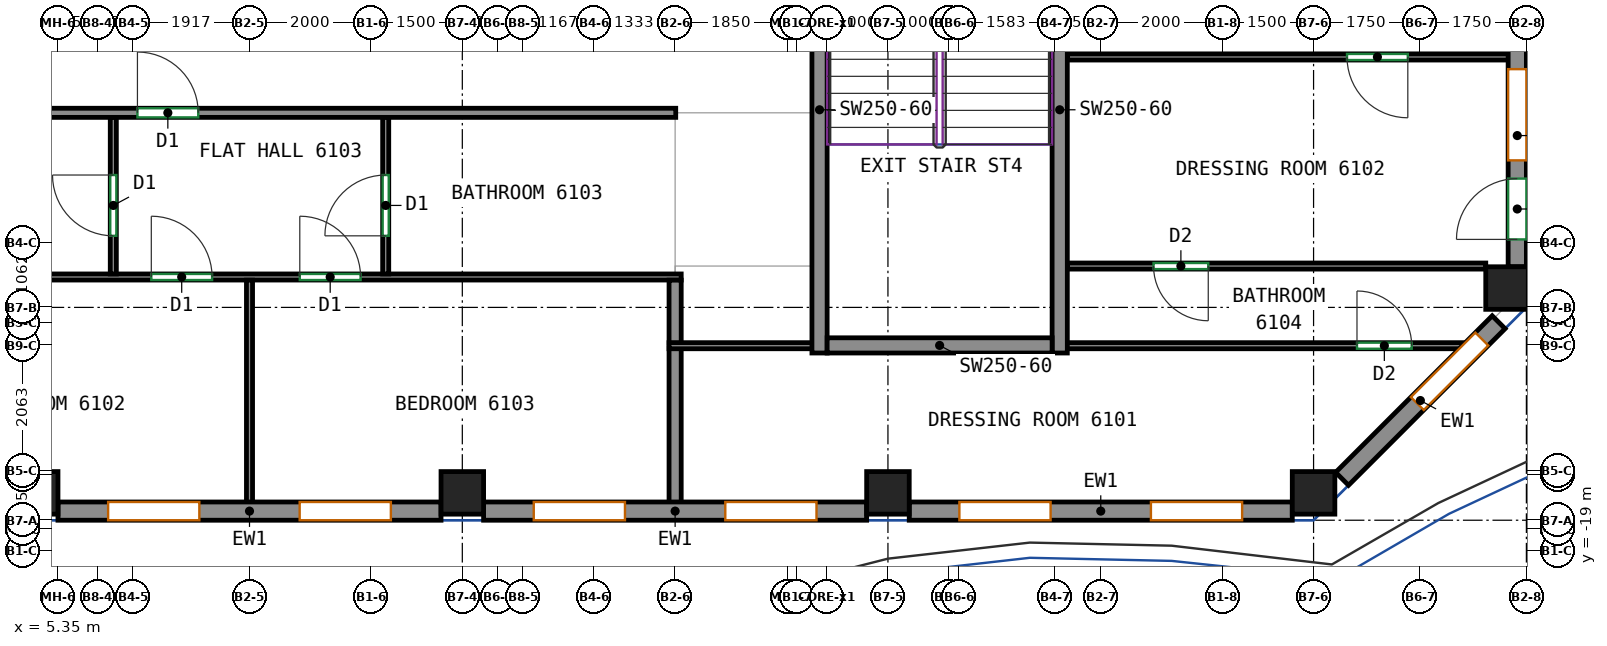
"""IFC4 building model, lengths in metres.
Left out: names, types, materials, properties, quantities, classifications, styles, units other than length and angle.
Written with IfcOpenShell. Run it as: python <this file> out.ifc"""

import sys

from ifc_helpers import new_model, si_unit, direction, frame, frame_2d, origin, origin_2d, place, context, subcontext, project, spatial, rectangle, extrude, source, transform, mapped, element, fill, save


model = new_model("IFC4")
c1 = context("Model", 3, precision=1e-05, world=origin(), true_north=direction((0.0, 1.0)))
c2 = subcontext(c1, "Body", "Model", "MODEL_VIEW")
j1 = project(units=[si_unit("LENGTHUNIT", "METRE"), si_unit("PLANEANGLEUNIT", "RADIAN")], contexts=[c1])
p1 = place(None, origin())
s1 = spatial("IfcSite", under=j1, at=p1, CompositionType="ELEMENT")
p2 = place(p1, origin())
s2 = spatial("IfcBuilding", under=s1, at=p2, CompositionType="ELEMENT")
p3 = place(p2, frame((0.0, 0.0, 252.6)))
s3 = spatial("IfcBuildingStorey", under=s2, at=p3, CompositionType="ELEMENT", Elevation=252.6)
m1 = source(origin(), c2, "Body", "SweptSolid", [
    extrude(rectangle(XDim=0.7, YDim=0.7, at=origin_2d()), origin(), (0.0, 0.0, 1.0), 3.12),
])
for number, where, z_axis, x_axis in (
    (1, (5.0, -18.05, 0.0), (0.0, 0.0, 1.0), (1.0, 0.0, 0.0)),
    (2, (12.0, -18.05, 0.0), (0.0, 0.0, 1.0), (1.0, 0.0, 0.0)),
    (3, (19.0, -18.05, 0.0), (0.0, 0.0, 1.0), (1.0, 0.0, 0.0)),
    (4, (26.0, -18.05, 0.0), (0.0, 0.0, 1.0), (1.0, 0.0, 0.0)),
    (5, (29.182, -14.682, 0.0), (0.0, 0.0, 1.0), (1.0, 0.0, 0.0)),
):
    element("IfcColumn", number, at=place(p3, frame(where, z_axis=z_axis, x_axis=x_axis)), inside=s3, PredefinedType="COLUMN", context=c2, shape_type="MappedRepresentation", body=[
        mapped(m1, transform((0.0, 0.0, 0.0))),
    ])
m2 = source(origin(), c2, "Body", "SweptSolid", [
    extrude(rectangle(XDim=8.0, YDim=0.25, at=frame_2d((4.0, 0.0))), origin(), (0.0, 0.0, 1.0), 3.12),
])
for number, where, z_axis, x_axis in (
    (6, (17.875, -15.75, 0.0), (0.0, 0.0, 1.0), (0.0, 1.0, 0.0)),
    (7, (21.825, -15.75, 0.0), (0.0, 0.0, 1.0), (0.0, 1.0, 0.0)),
):
    element("IfcWall", number, at=place(p3, frame(where, z_axis=z_axis, x_axis=x_axis)), inside=s3, PredefinedType="SHEAR", context=c2, shape_type="MappedRepresentation", body=[
        mapped(m2, transform((0.0, 0.0, 0.0))),
    ])
m3 = source(origin(), c2, "Body", "SweptSolid", [
    extrude(rectangle(XDim=3.7, YDim=0.25, at=frame_2d((1.85, 0.0))), origin(), (0.0, 0.0, 1.0), 3.12),
])
p4 = place(p3, frame((18.0, -15.625, 0.0), z_axis=(0.0, 0.0, 1.0), x_axis=(1.0, 0.0, 0.0)))
e8 = element("IfcWall", 8, at=p4, inside=s3, PredefinedType="SHEAR", context=c2, shape_type="MappedRepresentation", body=[
    mapped(m3, transform((0.0, 0.0, 0.0))),
])
m4 = source(origin(), c2, "Body", "SweptSolid", [
    extrude(rectangle(XDim=6.3, YDim=0.3, at=frame_2d((3.15, 0.0))), origin(), (0.0, 0.0, 1.0), 3.12),
])
p5 = place(p3, frame((5.35, -18.35, 0.0), z_axis=(0.0, 0.0, 1.0), x_axis=(1.0, 0.0, 0.0)))
e9 = element("IfcWall", 9, at=p5, inside=s3, PredefinedType="SOLIDWALL", context=c2, shape_type="MappedRepresentation", body=[
    mapped(m4, transform((0.0, 0.0, 0.0))),
])
p6 = place(p5, frame((0.825, 0.0, 0.8)))
e10 = element("IfcOpeningElement", 10, at=p6, cuts=e9, PredefinedType="OPENING", context=c2, shape_type="SweptSolid", body=[
    extrude(rectangle(XDim=1.5, YDim=2.05, at=frame_2d((0.75, 1.025))), frame((0.0, 0.16, 0.0), z_axis=(0.0, -1.0, 0.0), x_axis=(1.0, 0.0, 0.0)), (0.0, 0.0, 1.0), 0.32),
])
p7 = place(p5, frame((3.975, 0.0, 0.8)))
e11 = element("IfcOpeningElement", 11, at=p7, cuts=e9, PredefinedType="OPENING", context=c2, shape_type="SweptSolid", body=[
    extrude(rectangle(XDim=1.5, YDim=2.05, at=frame_2d((0.75, 1.025))), frame((0.0, 0.16, 0.0), z_axis=(0.0, -1.0, 0.0), x_axis=(1.0, 0.0, 0.0)), (0.0, 0.0, 1.0), 0.32),
])
p8 = place(p3, frame((12.35, -18.35, 0.0), z_axis=(0.0, 0.0, 1.0), x_axis=(1.0, 0.0, 0.0)))
e12 = element("IfcWall", 12, at=p8, inside=s3, PredefinedType="SOLIDWALL", context=c2, shape_type="MappedRepresentation", body=[
    mapped(m4, transform((0.0, 0.0, 0.0))),
])
p9 = place(p8, frame((0.825, 0.0, 0.8)))
e13 = element("IfcOpeningElement", 13, at=p9, cuts=e12, PredefinedType="OPENING", context=c2, shape_type="SweptSolid", body=[
    extrude(rectangle(XDim=1.5, YDim=2.05, at=frame_2d((0.75, 1.025))), frame((0.0, 0.16, 0.0), z_axis=(0.0, -1.0, 0.0), x_axis=(1.0, 0.0, 0.0)), (0.0, 0.0, 1.0), 0.32),
])
p10 = place(p8, frame((3.975, 0.0, 0.8)))
e14 = element("IfcOpeningElement", 14, at=p10, cuts=e12, PredefinedType="OPENING", context=c2, shape_type="SweptSolid", body=[
    extrude(rectangle(XDim=1.5, YDim=2.05, at=frame_2d((0.75, 1.025))), frame((0.0, 0.16, 0.0), z_axis=(0.0, -1.0, 0.0), x_axis=(1.0, 0.0, 0.0)), (0.0, 0.0, 1.0), 0.32),
])
p11 = place(p3, frame((19.35, -18.35, 0.0), z_axis=(0.0, 0.0, 1.0), x_axis=(1.0, 0.0, 0.0)))
e15 = element("IfcWall", 15, at=p11, inside=s3, PredefinedType="SOLIDWALL", context=c2, shape_type="MappedRepresentation", body=[
    mapped(m4, transform((0.0, 0.0, 0.0))),
])
p12 = place(p11, frame((0.825, 0.0, 0.8)))
e16 = element("IfcOpeningElement", 16, at=p12, cuts=e15, PredefinedType="OPENING", context=c2, shape_type="SweptSolid", body=[
    extrude(rectangle(XDim=1.5, YDim=2.05, at=frame_2d((0.75, 1.025))), frame((0.0, 0.16, 0.0), z_axis=(0.0, -1.0, 0.0), x_axis=(1.0, 0.0, 0.0)), (0.0, 0.0, 1.0), 0.32),
])
p13 = place(p11, frame((3.975, 0.0, 0.8)))
e17 = element("IfcOpeningElement", 17, at=p13, cuts=e15, PredefinedType="OPENING", context=c2, shape_type="SweptSolid", body=[
    extrude(rectangle(XDim=1.5, YDim=2.05, at=frame_2d((0.75, 1.025))), frame((0.0, 0.16, 0.0), z_axis=(0.0, -1.0, 0.0), x_axis=(1.0, 0.0, 0.0)), (0.0, 0.0, 1.0), 0.32),
])
m5 = source(origin(), c2, "Body", "SweptSolid", [
    extrude(rectangle(XDim=3.642, YDim=0.3, at=frame_2d((1.821, 0.0))), origin(), (0.0, 0.0, 1.0), 3.12),
])
p14 = place(p3, frame((26.469, -17.819, 0.0), z_axis=(0.0, 0.0, 1.0), x_axis=(0.707106781187, 0.707106781187, 0.0)))
e18 = element("IfcWall", 18, at=p14, inside=s3, PredefinedType="SOLIDWALL", context=c2, shape_type="MappedRepresentation", body=[
    mapped(m5, transform((0.0, 0.0, 0.0))),
])
p15 = place(p14, frame((1.75, 0.0, 0.8)))
e19 = element("IfcOpeningElement", 19, at=p15, cuts=e18, PredefinedType="OPENING", context=c2, shape_type="SweptSolid", body=[
    extrude(rectangle(XDim=1.5, YDim=2.05, at=frame_2d((0.75, 1.025))), frame((0.0, 0.16, 0.0), z_axis=(0.0, -1.0, 0.0), x_axis=(1.0, 0.0, 0.0)), (0.0, 0.0, 1.0), 0.32),
])
m6 = source(origin(), c2, "Body", "SweptSolid", [
    extrude(rectangle(XDim=4.315, YDim=0.3, at=frame_2d((2.158, 0.0))), origin(), (0.0, 0.0, 1.0), 3.12),
])
p16 = place(p3, frame((29.35, -14.332, 0.0), z_axis=(0.0, 0.0, 1.0), x_axis=(0.0, 1.0, 0.0)))
e20 = element("IfcWall", 20, at=p16, inside=s3, PredefinedType="SOLIDWALL", context=c2, shape_type="MappedRepresentation", body=[
    mapped(m6, transform((0.0, 0.0, 0.0))),
])
p17 = place(p16, frame((1.75, 0.0, 0.8)))
e21 = element("IfcOpeningElement", 21, at=p17, cuts=e20, PredefinedType="OPENING", context=c2, shape_type="SweptSolid", body=[
    extrude(rectangle(XDim=1.5, YDim=2.05, at=frame_2d((0.75, 1.025))), frame((0.0, 0.16, 0.0), z_axis=(0.0, -1.0, 0.0), x_axis=(1.0, 0.0, 0.0)), (0.0, 0.0, 1.0), 0.32),
])
p18 = place(p16, frame((0.45, 0.0, 0.0)))
e22 = element("IfcOpeningElement", 22, at=p18, cuts=e20, PredefinedType="OPENING", context=c2, shape_type="SweptSolid", body=[
    extrude(rectangle(XDim=1.0, YDim=2.1, at=frame_2d((0.5, 1.05))), frame((0.0, 0.16, 0.0), z_axis=(0.0, -1.0, 0.0), x_axis=(1.0, 0.0, 0.0)), (0.0, 0.0, 1.0), 0.32),
])
p19 = place(p3, frame((-11.8, -11.8, 0.0), z_axis=(0.0, 0.0, 1.0), x_axis=(1.0, 0.0, 0.0)))
e23 = element("IfcWall", 23, at=p19, inside=s3, PredefinedType="PARTITIONING", context=c2, shape_type="SweptSolid", body=[
    extrude(rectangle(XDim=27.31, YDim=0.15, at=frame_2d((13.655, 0.0))), origin(), (0.0, 0.0, 1.0), 3.12),
])
p20 = place(p19, frame((5.021, 0.0, 0.0)))
e24 = element("IfcOpeningElement", 24, at=p20, cuts=e23, PredefinedType="OPENING", context=c2, shape_type="SweptSolid", body=[
    extrude(rectangle(XDim=1.0, YDim=2.1, at=frame_2d((0.5, 1.05))), frame((0.0, 0.085, 0.0), z_axis=(0.0, -1.0, 0.0), x_axis=(1.0, 0.0, 0.0)), (0.0, 0.0, 1.0), 0.17),
])
p21 = place(p19, frame((18.457, 0.0, 0.0)))
e25 = element("IfcOpeningElement", 25, at=p21, cuts=e23, PredefinedType="OPENING", context=c2, shape_type="SweptSolid", body=[
    extrude(rectangle(XDim=1.0, YDim=2.1, at=frame_2d((0.5, 1.05))), frame((0.0, 0.085, 0.0), z_axis=(0.0, -1.0, 0.0), x_axis=(1.0, 0.0, 0.0)), (0.0, 0.0, 1.0), 0.17),
])
p22 = place(p3, frame((-9.06, -14.5, 0.0), z_axis=(0.0, 0.0, 1.0), x_axis=(1.0, 0.0, 0.0)))
e26 = element("IfcWall", 26, at=p22, inside=s3, PredefinedType="PARTITIONING", context=c2, shape_type="SweptSolid", body=[
    extrude(rectangle(XDim=24.66, YDim=0.1, at=frame_2d((12.33, 0.0))), origin(), (0.0, 0.0, 1.0), 3.12),
])
p23 = place(p22, frame((0.924, 0.0, 0.0)))
e27 = element("IfcOpeningElement", 27, at=p23, cuts=e26, PredefinedType="OPENING", context=c2, shape_type="SweptSolid", body=[
    extrude(rectangle(XDim=1.0, YDim=2.1, at=frame_2d((0.5, 1.05))), frame((0.0, 0.06, 0.0), z_axis=(0.0, -1.0, 0.0), x_axis=(1.0, 0.0, 0.0)), (0.0, 0.0, 1.0), 0.12),
])
p24 = place(p22, frame((15.945, 0.0, 0.0)))
e28 = element("IfcOpeningElement", 28, at=p24, cuts=e26, PredefinedType="OPENING", context=c2, shape_type="SweptSolid", body=[
    extrude(rectangle(XDim=1.0, YDim=2.1, at=frame_2d((0.5, 1.05))), frame((0.0, 0.06, 0.0), z_axis=(0.0, -1.0, 0.0), x_axis=(1.0, 0.0, 0.0)), (0.0, 0.0, 1.0), 0.12),
])
p25 = place(p22, frame((18.387, 0.0, 0.0)))
e29 = element("IfcOpeningElement", 29, at=p25, cuts=e26, PredefinedType="OPENING", context=c2, shape_type="SweptSolid", body=[
    extrude(rectangle(XDim=1.0, YDim=2.1, at=frame_2d((0.5, 1.05))), frame((0.0, 0.06, 0.0), z_axis=(0.0, -1.0, 0.0), x_axis=(1.0, 0.0, 0.0)), (0.0, 0.0, 1.0), 0.12),
])
p26 = place(p3, frame((6.26, -14.45, 0.0), z_axis=(0.0, 0.0, 1.0), x_axis=(0.0, 1.0, 0.0)))
e30 = element("IfcWall", 30, at=p26, inside=s3, PredefinedType="PARTITIONING", context=c2, shape_type="SweptSolid", body=[
    extrude(rectangle(XDim=2.573, YDim=0.1, at=frame_2d((1.287, 0.0))), origin(), (0.0, 0.0, 1.0), 3.12),
])
p27 = place(p26, frame((0.627, 0.0, 0.0)))
e31 = element("IfcOpeningElement", 31, at=p27, cuts=e30, PredefinedType="OPENING", context=c2, shape_type="SweptSolid", body=[
    extrude(rectangle(XDim=1.0, YDim=2.1, at=frame_2d((0.5, 1.05))), frame((0.0, 0.06, 0.0), z_axis=(0.0, -1.0, 0.0), x_axis=(1.0, 0.0, 0.0)), (0.0, 0.0, 1.0), 0.12),
])
p28 = place(p3, frame((10.74, -14.45, 0.0), z_axis=(0.0, 0.0, 1.0), x_axis=(0.0, 1.0, 0.0)))
e32 = element("IfcWall", 32, at=p28, inside=s3, PredefinedType="PARTITIONING", context=c2, shape_type="SweptSolid", body=[
    extrude(rectangle(XDim=2.573, YDim=0.1, at=frame_2d((1.287, 0.0))), origin(), (0.0, 0.0, 1.0), 3.12),
])
p29 = place(p28, frame((0.627, 0.0, 0.0)))
e33 = element("IfcOpeningElement", 33, at=p29, cuts=e32, PredefinedType="OPENING", context=c2, shape_type="SweptSolid", body=[
    extrude(rectangle(XDim=1.0, YDim=2.1, at=frame_2d((0.5, 1.05))), frame((0.0, 0.06, 0.0), z_axis=(0.0, -1.0, 0.0), x_axis=(1.0, 0.0, 0.0)), (0.0, 0.0, 1.0), 0.12),
])
p30 = place(p3, frame((8.5, -18.25, 0.0), z_axis=(0.0, 0.0, 1.0), x_axis=(0.0, 1.0, 0.0)))
e34 = element("IfcWall", 34, at=p30, inside=s3, PredefinedType="PARTITIONING", context=c2, shape_type="SweptSolid", body=[
    extrude(rectangle(XDim=3.698, YDim=0.1, at=frame_2d((1.849, 0.0))), origin(), (0.0, 0.0, 1.0), 3.12),
])
p31 = place(p3, frame((15.5, -18.25, 0.0), z_axis=(0.0, 0.0, 1.0), x_axis=(0.0, 1.0, 0.0)))
e35 = element("IfcWall", 35, at=p31, inside=s3, PredefinedType="PARTITIONING", context=c2, shape_type="SweptSolid", body=[
    extrude(rectangle(XDim=2.58, YDim=0.2, at=frame_2d((1.29, 0.0))), origin(), (0.0, 0.0, 1.0), 3.12),
])
p32 = place(p3, frame((15.5, -15.59, 0.0), z_axis=(0.0, 0.0, 1.0), x_axis=(0.0, 1.0, 0.0)))
e36 = element("IfcWall", 36, at=p32, inside=s3, PredefinedType="PARTITIONING", context=c2, shape_type="SweptSolid", body=[
    extrude(rectangle(XDim=1.038, YDim=0.2, at=frame_2d((0.519, 0.0))), origin(), (0.0, 0.0, 1.0), 3.12),
])
p33 = place(p3, frame((21.9, -15.63, 0.0), z_axis=(0.0, 0.0, 1.0), x_axis=(1.0, 0.0, 0.0)))
e37 = element("IfcWall", 37, at=p33, inside=s3, PredefinedType="PARTITIONING", context=c2, shape_type="SweptSolid", body=[
    extrude(rectangle(XDim=6.616, YDim=0.1, at=frame_2d((3.308, 0.0))), origin(), (0.0, 0.0, 1.0), 3.12),
])
p34 = place(p33, frame((4.814, 0.0, 0.0)))
e38 = element("IfcOpeningElement", 38, at=p34, cuts=e37, PredefinedType="OPENING", context=c2, shape_type="SweptSolid", body=[
    extrude(rectangle(XDim=0.9, YDim=2.1, at=frame_2d((0.45, 1.05))), frame((0.0, 0.06, 0.0), z_axis=(0.0, -1.0, 0.0), x_axis=(1.0, 0.0, 0.0)), (0.0, 0.0, 1.0), 0.12),
])
p35 = place(p3, frame((15.4, -15.63, 0.0), z_axis=(0.0, 0.0, 1.0), x_axis=(1.0, 0.0, 0.0)))
e39 = element("IfcWall", 39, at=p35, inside=s3, PredefinedType="PARTITIONING", context=c2, shape_type="SweptSolid", body=[
    extrude(rectangle(XDim=2.4, YDim=0.1, at=frame_2d((1.2, 0.0))), origin(), (0.0, 0.0, 1.0), 3.12),
])
p36 = place(p3, frame((28.832, -14.32, 0.0), z_axis=(0.0, 0.0, 1.0), x_axis=(-1.0, 0.0, 0.0)))
e40 = element("IfcWall", 40, at=p36, inside=s3, PredefinedType="PARTITIONING", context=c2, shape_type="SweptSolid", body=[
    extrude(rectangle(XDim=6.882, YDim=0.1, at=frame_2d((3.441, 0.0))), origin(), (0.0, 0.0, 1.0), 3.12),
])
p37 = place(p36, frame((4.564, 0.0, 0.0)))
e41 = element("IfcOpeningElement", 41, at=p37, cuts=e40, PredefinedType="OPENING", context=c2, shape_type="SweptSolid", body=[
    extrude(rectangle(XDim=0.9, YDim=2.1, at=frame_2d((0.45, 1.05))), frame((0.0, 0.06, 0.0), z_axis=(0.0, -1.0, 0.0), x_axis=(1.0, 0.0, 0.0)), (0.0, 0.0, 1.0), 0.12),
])
p38 = place(p3, frame((29.25, -10.882, 0.0), z_axis=(0.0, 0.0, 1.0), x_axis=(-1.0, 0.0, 0.0)))
e42 = element("IfcWall", 42, at=p38, inside=s3, PredefinedType="PARTITIONING", context=c2, shape_type="SweptSolid", body=[
    extrude(rectangle(XDim=7.3, YDim=0.1, at=frame_2d((3.65, 0.0))), origin(), (0.0, 0.0, 1.0), 3.12),
])
p39 = place(p38, frame((1.7, 0.0, 0.0)))
e43 = element("IfcOpeningElement", 43, at=p39, cuts=e42, PredefinedType="OPENING", context=c2, shape_type="SweptSolid", body=[
    extrude(rectangle(XDim=1.0, YDim=2.1, at=frame_2d((0.5, 1.05))), frame((0.0, 0.06, 0.0), z_axis=(0.0, -1.0, 0.0), x_axis=(1.0, 0.0, 0.0)), (0.0, 0.0, 1.0), 0.12),
])
p40 = place(p6, origin())
e44 = element("IfcWindow", 44, at=p40, inside=s3, PartitioningType="SINGLE_PANEL", PredefinedType="WINDOW", context=c2, shape_type="SweptSolid", body=[
    extrude(rectangle(XDim=1.5, YDim=2.05, at=frame_2d((0.75, 1.025))), frame((0.0, 0.03, 0.0), z_axis=(0.0, -1.0, 0.0), x_axis=(1.0, 0.0, 0.0)), (0.0, 0.0, 1.0), 0.06),
])
fill(e10, e44)
p41 = place(p7, origin())
e45 = element("IfcWindow", 45, at=p41, inside=s3, PartitioningType="SINGLE_PANEL", PredefinedType="WINDOW", context=c2, shape_type="SweptSolid", body=[
    extrude(rectangle(XDim=1.5, YDim=2.05, at=frame_2d((0.75, 1.025))), frame((0.0, 0.03, 0.0), z_axis=(0.0, -1.0, 0.0), x_axis=(1.0, 0.0, 0.0)), (0.0, 0.0, 1.0), 0.06),
])
fill(e11, e45)
p42 = place(p9, origin())
e46 = element("IfcWindow", 46, at=p42, inside=s3, PartitioningType="SINGLE_PANEL", PredefinedType="WINDOW", context=c2, shape_type="SweptSolid", body=[
    extrude(rectangle(XDim=1.5, YDim=2.05, at=frame_2d((0.75, 1.025))), frame((0.0, 0.03, 0.0), z_axis=(0.0, -1.0, 0.0), x_axis=(1.0, 0.0, 0.0)), (0.0, 0.0, 1.0), 0.06),
])
fill(e13, e46)
p43 = place(p10, origin())
e47 = element("IfcWindow", 47, at=p43, inside=s3, PartitioningType="SINGLE_PANEL", PredefinedType="WINDOW", context=c2, shape_type="SweptSolid", body=[
    extrude(rectangle(XDim=1.5, YDim=2.05, at=frame_2d((0.75, 1.025))), frame((0.0, 0.03, 0.0), z_axis=(0.0, -1.0, 0.0), x_axis=(1.0, 0.0, 0.0)), (0.0, 0.0, 1.0), 0.06),
])
fill(e14, e47)
p44 = place(p12, origin())
e48 = element("IfcWindow", 48, at=p44, inside=s3, PartitioningType="SINGLE_PANEL", PredefinedType="WINDOW", context=c2, shape_type="SweptSolid", body=[
    extrude(rectangle(XDim=1.5, YDim=2.05, at=frame_2d((0.75, 1.025))), frame((0.0, 0.03, 0.0), z_axis=(0.0, -1.0, 0.0), x_axis=(1.0, 0.0, 0.0)), (0.0, 0.0, 1.0), 0.06),
])
fill(e16, e48)
p45 = place(p13, origin())
e49 = element("IfcWindow", 49, at=p45, inside=s3, PartitioningType="SINGLE_PANEL", PredefinedType="WINDOW", context=c2, shape_type="SweptSolid", body=[
    extrude(rectangle(XDim=1.5, YDim=2.05, at=frame_2d((0.75, 1.025))), frame((0.0, 0.03, 0.0), z_axis=(0.0, -1.0, 0.0), x_axis=(1.0, 0.0, 0.0)), (0.0, 0.0, 1.0), 0.06),
])
fill(e17, e49)
p46 = place(p15, origin())
e50 = element("IfcWindow", 50, at=p46, inside=s3, PartitioningType="SINGLE_PANEL", PredefinedType="WINDOW", context=c2, shape_type="SweptSolid", body=[
    extrude(rectangle(XDim=1.5, YDim=2.05, at=frame_2d((0.75, 1.025))), frame((0.0, 0.03, 0.0), z_axis=(0.0, -1.0, 0.0), x_axis=(1.0, 0.0, 0.0)), (0.0, 0.0, 1.0), 0.06),
])
fill(e19, e50)
p47 = place(p17, origin())
e51 = element("IfcWindow", 51, at=p47, inside=s3, PartitioningType="SINGLE_PANEL", PredefinedType="WINDOW", context=c2, shape_type="SweptSolid", body=[
    extrude(rectangle(XDim=1.5, YDim=2.05, at=frame_2d((0.75, 1.025))), frame((0.0, 0.03, 0.0), z_axis=(0.0, -1.0, 0.0), x_axis=(1.0, 0.0, 0.0)), (0.0, 0.0, 1.0), 0.06),
])
fill(e21, e51)
p48 = place(p18, origin())
e52 = element("IfcDoor", 52, at=p48, inside=s3, OperationType="SINGLE_SWING_LEFT", PredefinedType="DOOR", context=c2, shape_type="SweptSolid", body=[
    extrude(rectangle(XDim=1.0, YDim=2.1, at=frame_2d((0.5, 1.05))), frame((0.0, 0.025, 0.0), z_axis=(0.0, -1.0, 0.0), x_axis=(1.0, 0.0, 0.0)), (0.0, 0.0, 1.0), 0.05),
])
fill(e22, e52)
p49 = place(p34, origin())
e53 = element("IfcDoor", 53, at=p49, inside=s3, OperationType="SINGLE_SWING_LEFT", PredefinedType="DOOR", context=c2, shape_type="SweptSolid", body=[
    extrude(rectangle(XDim=0.9, YDim=2.1, at=frame_2d((0.45, 1.05))), frame((0.0, 0.025, 0.0), z_axis=(0.0, -1.0, 0.0), x_axis=(1.0, 0.0, 0.0)), (0.0, 0.0, 1.0), 0.05),
])
fill(e38, e53)
p50 = place(p24, origin())
e54 = element("IfcDoor", 54, at=p50, inside=s3, OperationType="SINGLE_SWING_LEFT", PredefinedType="DOOR", context=c2, shape_type="SweptSolid", body=[
    extrude(rectangle(XDim=1.0, YDim=2.1, at=frame_2d((0.5, 1.05))), frame((0.0, 0.025, 0.0), z_axis=(0.0, -1.0, 0.0), x_axis=(1.0, 0.0, 0.0)), (0.0, 0.0, 1.0), 0.05),
])
fill(e28, e54)
p51 = place(p25, origin())
e55 = element("IfcDoor", 55, at=p51, inside=s3, OperationType="SINGLE_SWING_LEFT", PredefinedType="DOOR", context=c2, shape_type="SweptSolid", body=[
    extrude(rectangle(XDim=1.0, YDim=2.1, at=frame_2d((0.5, 1.05))), frame((0.0, 0.025, 0.0), z_axis=(0.0, -1.0, 0.0), x_axis=(1.0, 0.0, 0.0)), (0.0, 0.0, 1.0), 0.05),
])
fill(e29, e55)
p52 = place(p37, origin())
e56 = element("IfcDoor", 56, at=p52, inside=s3, OperationType="SINGLE_SWING_LEFT", PredefinedType="DOOR", context=c2, shape_type="SweptSolid", body=[
    extrude(rectangle(XDim=0.9, YDim=2.1, at=frame_2d((0.45, 1.05))), frame((0.0, 0.025, 0.0), z_axis=(0.0, -1.0, 0.0), x_axis=(1.0, 0.0, 0.0)), (0.0, 0.0, 1.0), 0.05),
])
fill(e41, e56)
p53 = place(p27, origin())
e57 = element("IfcDoor", 57, at=p53, inside=s3, OperationType="SINGLE_SWING_RIGHT", PredefinedType="DOOR", context=c2, shape_type="SweptSolid", body=[
    extrude(rectangle(XDim=1.0, YDim=2.1, at=frame_2d((0.5, 1.05))), frame((0.0, 0.025, 0.0), z_axis=(0.0, -1.0, 0.0), x_axis=(1.0, 0.0, 0.0)), (0.0, 0.0, 1.0), 0.05),
])
fill(e31, e57)
p54 = place(p29, origin())
e58 = element("IfcDoor", 58, at=p54, inside=s3, OperationType="SINGLE_SWING_LEFT", PredefinedType="DOOR", context=c2, shape_type="SweptSolid", body=[
    extrude(rectangle(XDim=1.0, YDim=2.1, at=frame_2d((0.5, 1.05))), frame((0.0, 0.025, 0.0), z_axis=(0.0, -1.0, 0.0), x_axis=(1.0, 0.0, 0.0)), (0.0, 0.0, 1.0), 0.05),
])
fill(e33, e58)
p55 = place(p21, origin())
e59 = element("IfcDoor", 59, at=p55, inside=s3, OperationType="SINGLE_SWING_LEFT", PredefinedType="DOOR", context=c2, shape_type="SweptSolid", body=[
    extrude(rectangle(XDim=1.0, YDim=2.1, at=frame_2d((0.5, 1.05))), frame((0.0, 0.025, 0.0), z_axis=(0.0, -1.0, 0.0), x_axis=(1.0, 0.0, 0.0)), (0.0, 0.0, 1.0), 0.05),
])
fill(e25, e59)
p56 = place(p39, origin())
e60 = element("IfcDoor", 60, at=p56, inside=s3, OperationType="SINGLE_SWING_LEFT", PredefinedType="DOOR", context=c2, shape_type="SweptSolid", body=[
    extrude(rectangle(XDim=1.0, YDim=2.1, at=frame_2d((0.5, 1.05))), frame((0.0, 0.025, 0.0), z_axis=(0.0, -1.0, 0.0), x_axis=(1.0, 0.0, 0.0)), (0.0, 0.0, 1.0), 0.05),
])
fill(e43, e60)
save(model, sys.argv[1])
